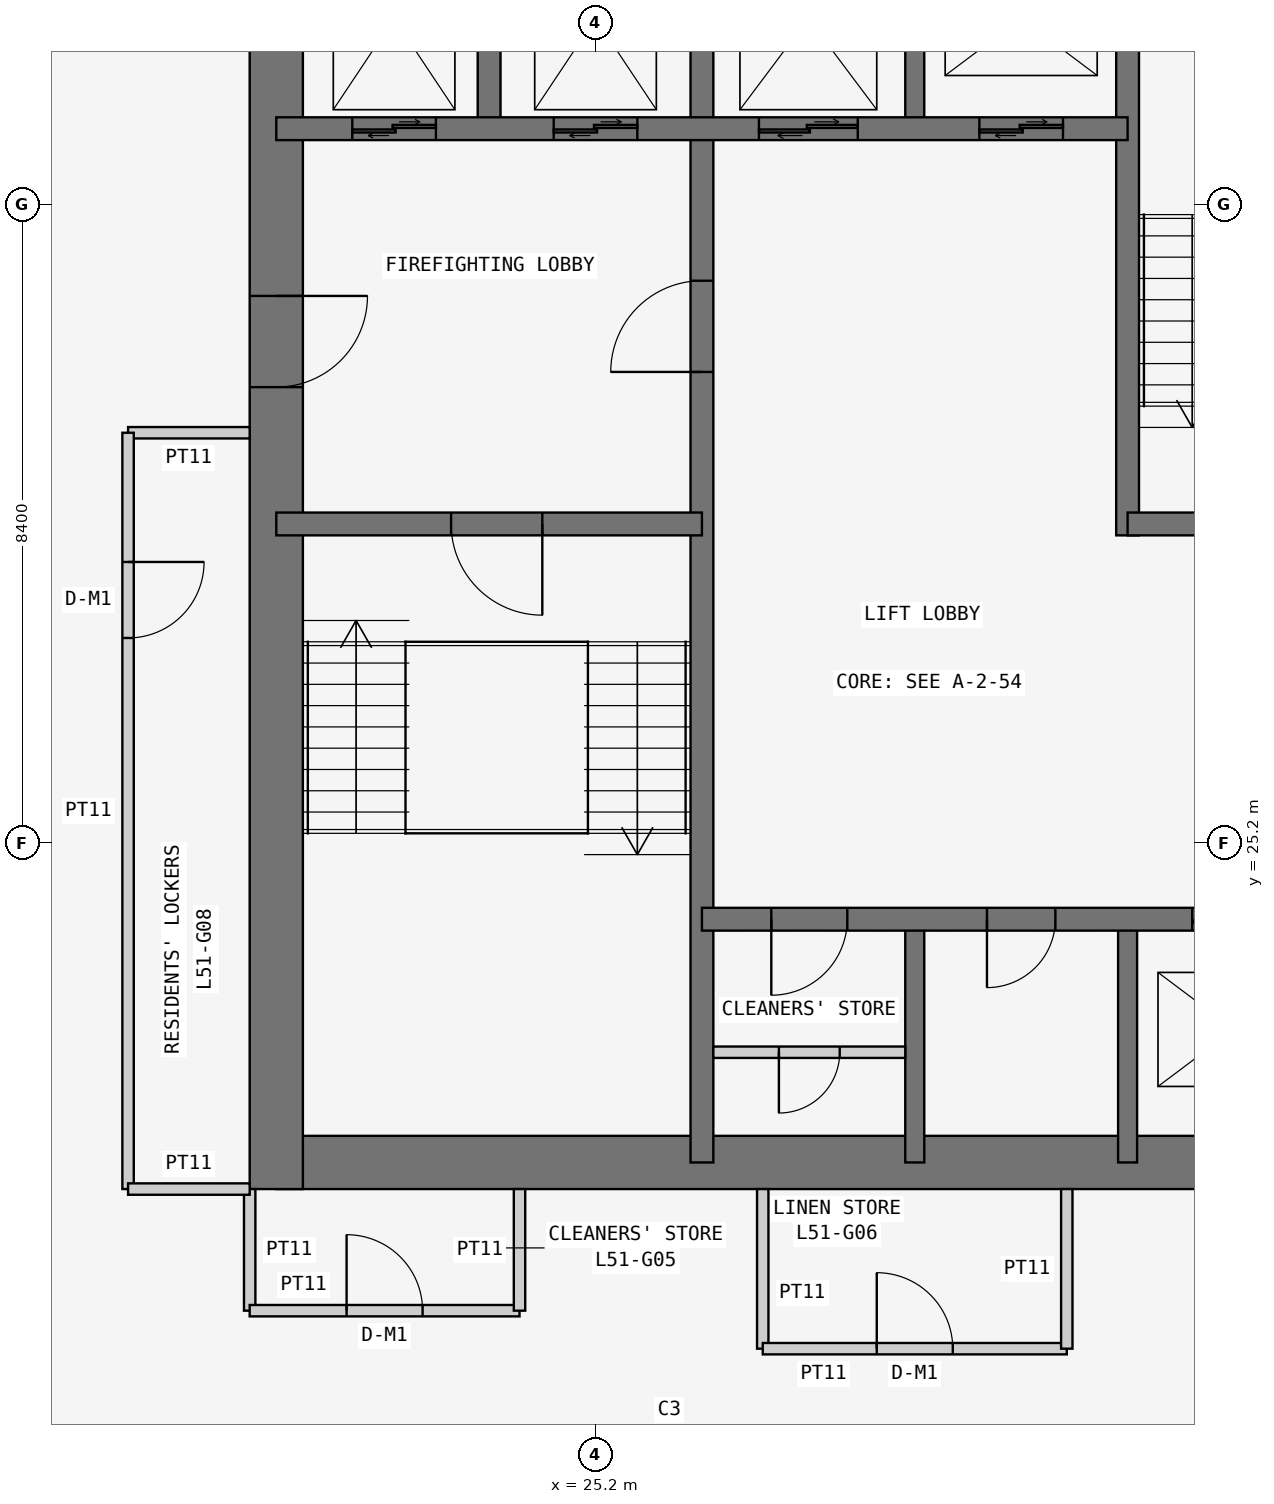
"""IFC4 building model, lengths in metres.
Left out: names, types, materials, properties, quantities, classifications, styles, units other than length and angle.
Written with IfcOpenShell. Run it as: python <this file> out.ifc"""

import sys

from ifc_helpers import new_model, si_unit, direction, frame, frame_2d, origin, place, context, subcontext, project, spatial, rectangle, extrude, element, fill, save


model = new_model("IFC4")
c1 = context("Model", 3, precision=1e-05, world=origin(), true_north=direction((0.0, 1.0)))
c2 = subcontext(c1, "Body", "Model", "MODEL_VIEW")
j1 = project(units=[si_unit("LENGTHUNIT", "METRE"), si_unit("PLANEANGLEUNIT", "RADIAN")], contexts=[c1])
p1 = place(None, origin())
s1 = spatial("IfcSite", under=j1, at=p1, CompositionType="ELEMENT")
p2 = place(p1, origin())
s2 = spatial("IfcBuilding", under=s1, at=p2, CompositionType="ELEMENT")
p3 = place(p2, frame((0.0, 0.0, 197.7)))
s3 = spatial("IfcBuildingStorey", under=s2, at=p3, CompositionType="ELEMENT", Elevation=197.7)
p4 = place(p3, frame((21.0, 21.0, 0.0), z_axis=(0.0, 0.0, 1.0), x_axis=(1.0, 0.0, 0.0)))
e1 = element("IfcWall", 1, at=p4, inside=s3, PredefinedType="SHEAR", context=c2, shape_type="SweptSolid", body=[
    extrude(rectangle(XDim=17.15, YDim=0.7, at=frame_2d((8.575, 0.0))), origin(), (0.0, 0.0, 1.0), 3.6),
])
p5 = place(p3, frame((21.0, 37.8, 0.0), z_axis=(0.0, 0.0, 1.0), x_axis=(0.0, -1.0, 0.0)))
e2 = element("IfcWall", 2, at=p5, inside=s3, PredefinedType="SHEAR", context=c2, shape_type="SweptSolid", body=[
    extrude(rectangle(XDim=17.15, YDim=0.7, at=frame_2d((8.575, 0.0))), origin(), (0.0, 0.0, 1.0), 3.6),
])
p6 = place(p5, frame((5.4, 0.0, 0.0)))
e3 = element("IfcOpeningElement", 3, at=p6, cuts=e2, PredefinedType="OPENING", context=c2, shape_type="SweptSolid", body=[
    extrude(rectangle(XDim=1.2, YDim=2.1, at=frame_2d((0.6, 1.05))), frame((0.0, 0.36, 0.0), z_axis=(0.0, -1.0, 0.0), x_axis=(1.0, 0.0, 0.0)), (0.0, 0.0, 1.0), 0.72),
])
p7 = place(p3, frame((26.6, 21.0, 0.0), z_axis=(0.0, 0.0, 1.0), x_axis=(0.0, 1.0, 0.0)))
e4 = element("IfcWall", 4, at=p7, inside=s3, PredefinedType="SHEAR", context=c2, shape_type="SweptSolid", body=[
    extrude(rectangle(XDim=16.8, YDim=0.3, at=frame_2d((8.4, 0.0))), origin(), (0.0, 0.0, 1.0), 3.6),
])
p8 = place(p7, frame((10.4, 0.0, 0.0)))
e5 = element("IfcOpeningElement", 5, at=p8, cuts=e4, PredefinedType="OPENING", context=c2, shape_type="SweptSolid", body=[
    extrude(rectangle(XDim=1.2, YDim=2.1, at=frame_2d((0.6, 1.05))), frame((0.0, 0.16, 0.0), z_axis=(0.0, -1.0, 0.0), x_axis=(1.0, 0.0, 0.0)), (0.0, 0.0, 1.0), 0.32),
])
p9 = place(p3, frame((21.0, 29.4, 0.0), z_axis=(0.0, 0.0, 1.0), x_axis=(1.0, 0.0, 0.0)))
e6 = element("IfcWall", 6, at=p9, inside=s3, PredefinedType="SHEAR", context=c2, shape_type="SweptSolid", body=[
    extrude(rectangle(XDim=5.6, YDim=0.3, at=frame_2d((2.8, 0.0))), origin(), (0.0, 0.0, 1.0), 3.6),
])
p10 = place(p9, frame((2.3, 0.0, 0.0)))
e7 = element("IfcOpeningElement", 7, at=p10, cuts=e6, PredefinedType="OPENING", context=c2, shape_type="SweptSolid", body=[
    extrude(rectangle(XDim=1.2, YDim=2.1, at=frame_2d((0.6, 1.05))), frame((0.0, 0.16, 0.0), z_axis=(0.0, -1.0, 0.0), x_axis=(1.0, 0.0, 0.0)), (0.0, 0.0, 1.0), 0.32),
])
p11 = place(p3, frame((21.0, 34.6, 0.0), z_axis=(0.0, 0.0, 1.0), x_axis=(1.0, 0.0, 0.0)))
e8 = element("IfcWall", 8, at=p11, inside=s3, PredefinedType="SHEAR", context=c2, shape_type="SweptSolid", body=[
    extrude(rectangle(XDim=11.2, YDim=0.3, at=frame_2d((5.6, 0.0))), origin(), (0.0, 0.0, 1.0), 3.6),
])
p12 = place(p11, frame((9.25, 0.0, 0.0)))
e9 = element("IfcOpeningElement", 9, at=p12, cuts=e8, PredefinedType="OPENING", context=c2, shape_type="SweptSolid", body=[
    extrude(rectangle(XDim=1.1, YDim=2.1, at=frame_2d((0.55, 1.05))), frame((0.0, 0.16, 0.0), z_axis=(0.0, -1.0, 0.0), x_axis=(1.0, 0.0, 0.0)), (0.0, 0.0, 1.0), 0.32),
])
p13 = place(p11, frame((1.0, 0.0, 0.0)))
e10 = element("IfcOpeningElement", 10, at=p13, cuts=e8, PredefinedType="OPENING", context=c2, shape_type="SweptSolid", body=[
    extrude(rectangle(XDim=1.1, YDim=2.1, at=frame_2d((0.55, 1.05))), frame((0.0, 0.16, 0.0), z_axis=(0.0, -1.0, 0.0), x_axis=(1.0, 0.0, 0.0)), (0.0, 0.0, 1.0), 0.32),
])
p14 = place(p11, frame((3.65, 0.0, 0.0)))
e11 = element("IfcOpeningElement", 11, at=p14, cuts=e8, PredefinedType="OPENING", context=c2, shape_type="SweptSolid", body=[
    extrude(rectangle(XDim=1.1, YDim=2.1, at=frame_2d((0.55, 1.05))), frame((0.0, 0.16, 0.0), z_axis=(0.0, -1.0, 0.0), x_axis=(1.0, 0.0, 0.0)), (0.0, 0.0, 1.0), 0.32),
])
p15 = place(p11, frame((6.35, 0.0, 0.0)))
e12 = element("IfcOpeningElement", 12, at=p15, cuts=e8, PredefinedType="OPENING", context=c2, shape_type="SweptSolid", body=[
    extrude(rectangle(XDim=1.3, YDim=2.1, at=frame_2d((0.65, 1.05))), frame((0.0, 0.16, 0.0), z_axis=(0.0, -1.0, 0.0), x_axis=(1.0, 0.0, 0.0)), (0.0, 0.0, 1.0), 0.32),
])
p16 = place(p3, frame((23.8, 34.6, 0.0), z_axis=(0.0, 0.0, 1.0), x_axis=(0.0, 1.0, 0.0)))
e13 = element("IfcWall", 13, at=p16, inside=s3, PredefinedType="SHEAR", context=c2, shape_type="SweptSolid", body=[
    extrude(rectangle(XDim=3.2, YDim=0.3, at=frame_2d((1.6, 0.0))), origin(), (0.0, 0.0, 1.0), 3.6),
])
p17 = place(p3, frame((26.6, 24.2, 0.0), z_axis=(0.0, 0.0, 1.0), x_axis=(1.0, 0.0, 0.0)))
e14 = element("IfcWall", 14, at=p17, inside=s3, PredefinedType="SHEAR", context=c2, shape_type="SweptSolid", body=[
    extrude(rectangle(XDim=11.2, YDim=0.3, at=frame_2d((5.6, 0.0))), origin(), (0.0, 0.0, 1.0), 3.6),
])
p18 = place(p17, frame((0.913, 0.0, 0.0)))
e15 = element("IfcOpeningElement", 15, at=p18, cuts=e14, PredefinedType="OPENING", context=c2, shape_type="SweptSolid", body=[
    extrude(rectangle(XDim=1.0, YDim=2.1, at=frame_2d((0.5, 1.05))), frame((0.0, 0.16, 0.0), z_axis=(0.0, -1.0, 0.0), x_axis=(1.0, 0.0, 0.0)), (0.0, 0.0, 1.0), 0.32),
])
p19 = place(p17, frame((3.75, 0.0, 0.0)))
e16 = element("IfcOpeningElement", 16, at=p19, cuts=e14, PredefinedType="OPENING", context=c2, shape_type="SweptSolid", body=[
    extrude(rectangle(XDim=0.9, YDim=2.1, at=frame_2d((0.45, 1.05))), frame((0.0, 0.16, 0.0), z_axis=(0.0, -1.0, 0.0), x_axis=(1.0, 0.0, 0.0)), (0.0, 0.0, 1.0), 0.32),
])
p20 = place(p17, frame((6.45, 0.0, 0.0)))
e17 = element("IfcOpeningElement", 17, at=p20, cuts=e14, PredefinedType="OPENING", context=c2, shape_type="SweptSolid", body=[
    extrude(rectangle(XDim=1.1, YDim=2.1, at=frame_2d((0.55, 1.05))), frame((0.0, 0.16, 0.0), z_axis=(0.0, -1.0, 0.0), x_axis=(1.0, 0.0, 0.0)), (0.0, 0.0, 1.0), 0.32),
])
p21 = place(p17, frame((9.1, 0.0, 0.0)))
e18 = element("IfcOpeningElement", 18, at=p21, cuts=e14, PredefinedType="OPENING", context=c2, shape_type="SweptSolid", body=[
    extrude(rectangle(XDim=1.1, YDim=2.1, at=frame_2d((0.55, 1.05))), frame((0.0, 0.16, 0.0), z_axis=(0.0, -1.0, 0.0), x_axis=(1.0, 0.0, 0.0)), (0.0, 0.0, 1.0), 0.32),
])
p22 = place(p3, frame((32.2, 29.25, 0.0), z_axis=(0.0, 0.0, 1.0), x_axis=(0.0, 1.0, 0.0)))
e19 = element("IfcWall", 19, at=p22, inside=s3, PredefinedType="SHEAR", context=c2, shape_type="SweptSolid", body=[
    extrude(rectangle(XDim=8.55, YDim=0.3, at=frame_2d((4.275, 0.0))), origin(), (0.0, 0.0, 1.0), 3.6),
])
p23 = place(p3, frame((32.2, 29.4, 0.0), z_axis=(0.0, 0.0, 1.0), x_axis=(1.0, 0.0, 0.0)))
e20 = element("IfcWall", 20, at=p23, inside=s3, PredefinedType="SHEAR", context=c2, shape_type="SweptSolid", body=[
    extrude(rectangle(XDim=5.6, YDim=0.3, at=frame_2d((2.8, 0.0))), origin(), (0.0, 0.0, 1.0), 3.6),
])
p24 = place(p23, frame((2.0, 0.0, 0.0)))
e21 = element("IfcOpeningElement", 21, at=p24, cuts=e20, PredefinedType="OPENING", context=c2, shape_type="SweptSolid", body=[
    extrude(rectangle(XDim=1.2, YDim=2.1, at=frame_2d((0.6, 1.05))), frame((0.0, 0.16, 0.0), z_axis=(0.0, -1.0, 0.0), x_axis=(1.0, 0.0, 0.0)), (0.0, 0.0, 1.0), 0.32),
])
for number, where, z_axis, x_axis in (
    (22, (29.4, 21.0, 0.0), (0.0, 0.0, 1.0), (0.0, 1.0, 0.0)),
    (23, (32.2, 21.0, 0.0), (0.0, 0.0, 1.0), (0.0, 1.0, 0.0)),
    (24, (29.4, 34.6, 0.0), (0.0, 0.0, 1.0), (0.0, 1.0, 0.0)),
):
    element("IfcWall", number, at=place(p3, frame(where, z_axis=z_axis, x_axis=x_axis)), inside=s3, PredefinedType="SHEAR", context=c2, shape_type="SweptSolid", body=[
        extrude(rectangle(XDim=3.2, YDim=0.25, at=frame_2d((1.6, 0.0))), origin(), (0.0, 0.0, 1.0), 3.6),
    ])
p25 = place(p3, frame((20.65, 20.65, 0.0), z_axis=(0.0, 0.0, 1.0), x_axis=(0.0, -1.0, 0.0)))
e25 = element("IfcWall", 25, at=p25, inside=s3, PredefinedType="PARTITIONING", context=c2, shape_type="SweptSolid", body=[
    extrude(rectangle(XDim=1.6, YDim=0.15, at=frame_2d((0.8, 0.0))), origin(), (0.0, 0.0, 1.0), 3.45),
])
p26 = place(p3, frame((20.65, 19.05, 0.0), z_axis=(0.0, 0.0, 1.0), x_axis=(1.0, 0.0, 0.0)))
e26 = element("IfcWall", 26, at=p26, inside=s3, PredefinedType="PARTITIONING", context=c2, shape_type="SweptSolid", body=[
    extrude(rectangle(XDim=3.55, YDim=0.15, at=frame_2d((1.775, 0.0))), origin(), (0.0, 0.0, 1.0), 3.45),
])
p27 = place(p26, frame((1.275, 0.0, 0.0)))
e27 = element("IfcOpeningElement", 27, at=p27, cuts=e26, PredefinedType="OPENING", context=c2, shape_type="SweptSolid", body=[
    extrude(rectangle(XDim=1.0, YDim=2.1, at=frame_2d((0.5, 1.05))), frame((0.0, 0.085, 0.0), z_axis=(0.0, -1.0, 0.0), x_axis=(1.0, 0.0, 0.0)), (0.0, 0.0, 1.0), 0.17),
])
p28 = place(p3, frame((24.2, 19.05, 0.0), z_axis=(0.0, 0.0, 1.0), x_axis=(0.0, 1.0, 0.0)))
e28 = element("IfcWall", 28, at=p28, inside=s3, PredefinedType="PARTITIONING", context=c2, shape_type="SweptSolid", body=[
    extrude(rectangle(XDim=1.6, YDim=0.15, at=frame_2d((0.8, 0.0))), origin(), (0.0, 0.0, 1.0), 3.45),
])
p29 = place(p3, frame((27.4, 20.65, 0.0), z_axis=(0.0, 0.0, 1.0), x_axis=(0.0, -1.0, 0.0)))
e29 = element("IfcWall", 29, at=p29, inside=s3, PredefinedType="PARTITIONING", context=c2, shape_type="SweptSolid", body=[
    extrude(rectangle(XDim=2.1, YDim=0.15, at=frame_2d((1.05, 0.0))), origin(), (0.0, 0.0, 1.0), 3.45),
])
p30 = place(p3, frame((27.4, 18.55, 0.0), z_axis=(0.0, 0.0, 1.0), x_axis=(1.0, 0.0, 0.0)))
e30 = element("IfcWall", 30, at=p30, inside=s3, PredefinedType="PARTITIONING", context=c2, shape_type="SweptSolid", body=[
    extrude(rectangle(XDim=4.0, YDim=0.15, at=frame_2d((2.0, 0.0))), origin(), (0.0, 0.0, 1.0), 3.45),
])
p31 = place(p30, frame((1.5, 0.0, 0.0)))
e31 = element("IfcOpeningElement", 31, at=p31, cuts=e30, PredefinedType="OPENING", context=c2, shape_type="SweptSolid", body=[
    extrude(rectangle(XDim=1.0, YDim=2.1, at=frame_2d((0.5, 1.05))), frame((0.0, 0.085, 0.0), z_axis=(0.0, -1.0, 0.0), x_axis=(1.0, 0.0, 0.0)), (0.0, 0.0, 1.0), 0.17),
])
p32 = place(p3, frame((31.4, 18.55, 0.0), z_axis=(0.0, 0.0, 1.0), x_axis=(0.0, 1.0, 0.0)))
e32 = element("IfcWall", 32, at=p32, inside=s3, PredefinedType="PARTITIONING", context=c2, shape_type="SweptSolid", body=[
    extrude(rectangle(XDim=2.1, YDim=0.15, at=frame_2d((1.05, 0.0))), origin(), (0.0, 0.0, 1.0), 3.45),
])
p33 = place(p3, frame((20.65, 30.6, 0.0), z_axis=(0.0, 0.0, 1.0), x_axis=(-1.0, 0.0, 0.0)))
e33 = element("IfcWall", 33, at=p33, inside=s3, PredefinedType="PARTITIONING", context=c2, shape_type="SweptSolid", body=[
    extrude(rectangle(XDim=1.6, YDim=0.15, at=frame_2d((0.8, 0.0))), origin(), (0.0, 0.0, 1.0), 3.45),
])
p34 = place(p3, frame((19.05, 30.6, 0.0), z_axis=(0.0, 0.0, 1.0), x_axis=(0.0, -1.0, 0.0)))
e34 = element("IfcWall", 34, at=p34, inside=s3, PredefinedType="PARTITIONING", context=c2, shape_type="SweptSolid", body=[
    extrude(rectangle(XDim=9.95, YDim=0.15, at=frame_2d((4.975, 0.0))), origin(), (0.0, 0.0, 1.0), 3.45),
])
p35 = place(p34, frame((1.7, 0.0, 0.0)))
e35 = element("IfcOpeningElement", 35, at=p35, cuts=e34, PredefinedType="OPENING", context=c2, shape_type="SweptSolid", body=[
    extrude(rectangle(XDim=1.0, YDim=2.1, at=frame_2d((0.5, 1.05))), frame((0.0, 0.085, 0.0), z_axis=(0.0, -1.0, 0.0), x_axis=(1.0, 0.0, 0.0)), (0.0, 0.0, 1.0), 0.17),
])
p36 = place(p3, frame((19.05, 20.65, 0.0), z_axis=(0.0, 0.0, 1.0), x_axis=(1.0, 0.0, 0.0)))
e36 = element("IfcWall", 36, at=p36, inside=s3, PredefinedType="PARTITIONING", context=c2, shape_type="SweptSolid", body=[
    extrude(rectangle(XDim=1.6, YDim=0.15, at=frame_2d((0.8, 0.0))), origin(), (0.0, 0.0, 1.0), 3.45),
])
p37 = place(p3, frame((26.75, 22.45, 0.0), z_axis=(0.0, 0.0, 1.0), x_axis=(1.0, 0.0, 0.0)))
e37 = element("IfcWall", 37, at=p37, inside=s3, PredefinedType="PARTITIONING", context=c2, shape_type="SweptSolid", body=[
    extrude(rectangle(XDim=2.525, YDim=0.15, at=frame_2d((1.262, 0.0))), origin(), (0.0, 0.0, 1.0), 3.45),
])
p38 = place(p37, frame((0.863, 0.0, 0.0)))
e38 = element("IfcOpeningElement", 38, at=p38, cuts=e37, PredefinedType="OPENING", context=c2, shape_type="SweptSolid", body=[
    extrude(rectangle(XDim=0.8, YDim=2.1, at=frame_2d((0.4, 1.05))), frame((0.0, 0.085, 0.0), z_axis=(0.0, -1.0, 0.0), x_axis=(1.0, 0.0, 0.0)), (0.0, 0.0, 1.0), 0.17),
])
p39 = place(p27, origin())
e39 = element("IfcDoor", 39, at=p39, inside=s3, OperationType="SINGLE_SWING_LEFT", PredefinedType="DOOR", context=c2, shape_type="SweptSolid", body=[
    extrude(rectangle(XDim=1.0, YDim=2.1, at=frame_2d((0.5, 1.05))), frame((0.0, 0.025, 0.0), z_axis=(0.0, -1.0, 0.0), x_axis=(1.0, 0.0, 0.0)), (0.0, 0.0, 1.0), 0.05),
])
fill(e27, e39)
p40 = place(p31, origin())
e40 = element("IfcDoor", 40, at=p40, inside=s3, OperationType="SINGLE_SWING_LEFT", PredefinedType="DOOR", context=c2, shape_type="SweptSolid", body=[
    extrude(rectangle(XDim=1.0, YDim=2.1, at=frame_2d((0.5, 1.05))), frame((0.0, 0.025, 0.0), z_axis=(0.0, -1.0, 0.0), x_axis=(1.0, 0.0, 0.0)), (0.0, 0.0, 1.0), 0.05),
])
fill(e31, e40)
p41 = place(p35, origin())
e41 = element("IfcDoor", 41, at=p41, inside=s3, OperationType="SINGLE_SWING_LEFT", PredefinedType="DOOR", context=c2, shape_type="SweptSolid", body=[
    extrude(rectangle(XDim=1.0, YDim=2.1, at=frame_2d((0.5, 1.05))), frame((0.0, 0.025, 0.0), z_axis=(0.0, -1.0, 0.0), x_axis=(1.0, 0.0, 0.0)), (0.0, 0.0, 1.0), 0.05),
])
fill(e35, e41)
p42 = place(p6, origin())
e42 = element("IfcDoor", 42, at=p42, inside=s3, OperationType="SINGLE_SWING_LEFT", PredefinedType="DOOR", context=c2, shape_type="SweptSolid", body=[
    extrude(rectangle(XDim=1.2, YDim=2.1, at=frame_2d((0.6, 1.05))), frame((0.0, 0.025, 0.0), z_axis=(0.0, -1.0, 0.0), x_axis=(1.0, 0.0, 0.0)), (0.0, 0.0, 1.0), 0.05),
])
fill(e3, e42)
p43 = place(p10, frame((1.2, 0.0, 0.0), z_axis=(0.0, 0.0, 1.0), x_axis=(-1.0, 0.0, 0.0)))
e43 = element("IfcDoor", 43, at=p43, inside=s3, OperationType="SINGLE_SWING_LEFT", PredefinedType="DOOR", context=c2, shape_type="SweptSolid", body=[
    extrude(rectangle(XDim=1.2, YDim=2.1, at=frame_2d((0.6, 1.05))), frame((0.0, 0.025, 0.0), z_axis=(0.0, -1.0, 0.0), x_axis=(1.0, 0.0, 0.0)), (0.0, 0.0, 1.0), 0.05),
])
fill(e7, e43)
p44 = place(p8, origin())
e44 = element("IfcDoor", 44, at=p44, inside=s3, OperationType="SINGLE_SWING_LEFT", PredefinedType="DOOR", context=c2, shape_type="SweptSolid", body=[
    extrude(rectangle(XDim=1.2, YDim=2.1, at=frame_2d((0.6, 1.05))), frame((0.0, 0.025, 0.0), z_axis=(0.0, -1.0, 0.0), x_axis=(1.0, 0.0, 0.0)), (0.0, 0.0, 1.0), 0.05),
])
fill(e5, e44)
p45 = place(p18, frame((1.0, 0.0, 0.0), z_axis=(0.0, 0.0, 1.0), x_axis=(-1.0, 0.0, 0.0)))
e45 = element("IfcDoor", 45, at=p45, inside=s3, OperationType="SINGLE_SWING_RIGHT", PredefinedType="DOOR", context=c2, shape_type="SweptSolid", body=[
    extrude(rectangle(XDim=1.0, YDim=2.1, at=frame_2d((0.5, 1.05))), frame((0.0, 0.025, 0.0), z_axis=(0.0, -1.0, 0.0), x_axis=(1.0, 0.0, 0.0)), (0.0, 0.0, 1.0), 0.05),
])
fill(e15, e45)
p46 = place(p38, frame((0.8, 0.0, 0.0), z_axis=(0.0, 0.0, 1.0), x_axis=(-1.0, 0.0, 0.0)))
e46 = element("IfcDoor", 46, at=p46, inside=s3, OperationType="SINGLE_SWING_RIGHT", PredefinedType="DOOR", context=c2, shape_type="SweptSolid", body=[
    extrude(rectangle(XDim=0.8, YDim=2.1, at=frame_2d((0.4, 1.05))), frame((0.0, 0.025, 0.0), z_axis=(0.0, -1.0, 0.0), x_axis=(1.0, 0.0, 0.0)), (0.0, 0.0, 1.0), 0.05),
])
fill(e38, e46)
p47 = place(p19, frame((0.9, 0.0, 0.0), z_axis=(0.0, 0.0, 1.0), x_axis=(-1.0, 0.0, 0.0)))
e47 = element("IfcDoor", 47, at=p47, inside=s3, OperationType="SINGLE_SWING_RIGHT", PredefinedType="DOOR", context=c2, shape_type="SweptSolid", body=[
    extrude(rectangle(XDim=0.9, YDim=2.1, at=frame_2d((0.45, 1.05))), frame((0.0, 0.025, 0.0), z_axis=(0.0, -1.0, 0.0), x_axis=(1.0, 0.0, 0.0)), (0.0, 0.0, 1.0), 0.05),
])
fill(e16, e47)
p48 = place(p20, origin())
e48 = element("IfcDoor", 48, at=p48, inside=s3, OperationType="DOUBLE_DOOR_SLIDING", PredefinedType="DOOR", context=c2, shape_type="SweptSolid", body=[
    extrude(rectangle(XDim=1.1, YDim=2.1, at=frame_2d((0.55, 1.05))), frame((0.0, 0.025, 0.0), z_axis=(0.0, -1.0, 0.0), x_axis=(1.0, 0.0, 0.0)), (0.0, 0.0, 1.0), 0.05),
])
fill(e17, e48)
p49 = place(p12, origin())
e49 = element("IfcDoor", 49, at=p49, inside=s3, OperationType="DOUBLE_DOOR_SLIDING", PredefinedType="DOOR", context=c2, shape_type="SweptSolid", body=[
    extrude(rectangle(XDim=1.1, YDim=2.1, at=frame_2d((0.55, 1.05))), frame((0.0, 0.025, 0.0), z_axis=(0.0, -1.0, 0.0), x_axis=(1.0, 0.0, 0.0)), (0.0, 0.0, 1.0), 0.05),
])
fill(e9, e49)
p50 = place(p13, origin())
e50 = element("IfcDoor", 50, at=p50, inside=s3, OperationType="DOUBLE_DOOR_SLIDING", PredefinedType="DOOR", context=c2, shape_type="SweptSolid", body=[
    extrude(rectangle(XDim=1.1, YDim=2.1, at=frame_2d((0.55, 1.05))), frame((0.0, 0.025, 0.0), z_axis=(0.0, -1.0, 0.0), x_axis=(1.0, 0.0, 0.0)), (0.0, 0.0, 1.0), 0.05),
])
fill(e10, e50)
p51 = place(p14, origin())
e51 = element("IfcDoor", 51, at=p51, inside=s3, OperationType="DOUBLE_DOOR_SLIDING", PredefinedType="DOOR", context=c2, shape_type="SweptSolid", body=[
    extrude(rectangle(XDim=1.1, YDim=2.1, at=frame_2d((0.55, 1.05))), frame((0.0, 0.025, 0.0), z_axis=(0.0, -1.0, 0.0), x_axis=(1.0, 0.0, 0.0)), (0.0, 0.0, 1.0), 0.05),
])
fill(e11, e51)
p52 = place(p15, origin())
e52 = element("IfcDoor", 52, at=p52, inside=s3, OperationType="DOUBLE_DOOR_SLIDING", PredefinedType="DOOR", context=c2, shape_type="SweptSolid", body=[
    extrude(rectangle(XDim=1.3, YDim=2.1, at=frame_2d((0.65, 1.05))), frame((0.0, 0.025, 0.0), z_axis=(0.0, -1.0, 0.0), x_axis=(1.0, 0.0, 0.0)), (0.0, 0.0, 1.0), 0.05),
])
fill(e12, e52)
save(model, sys.argv[1])
